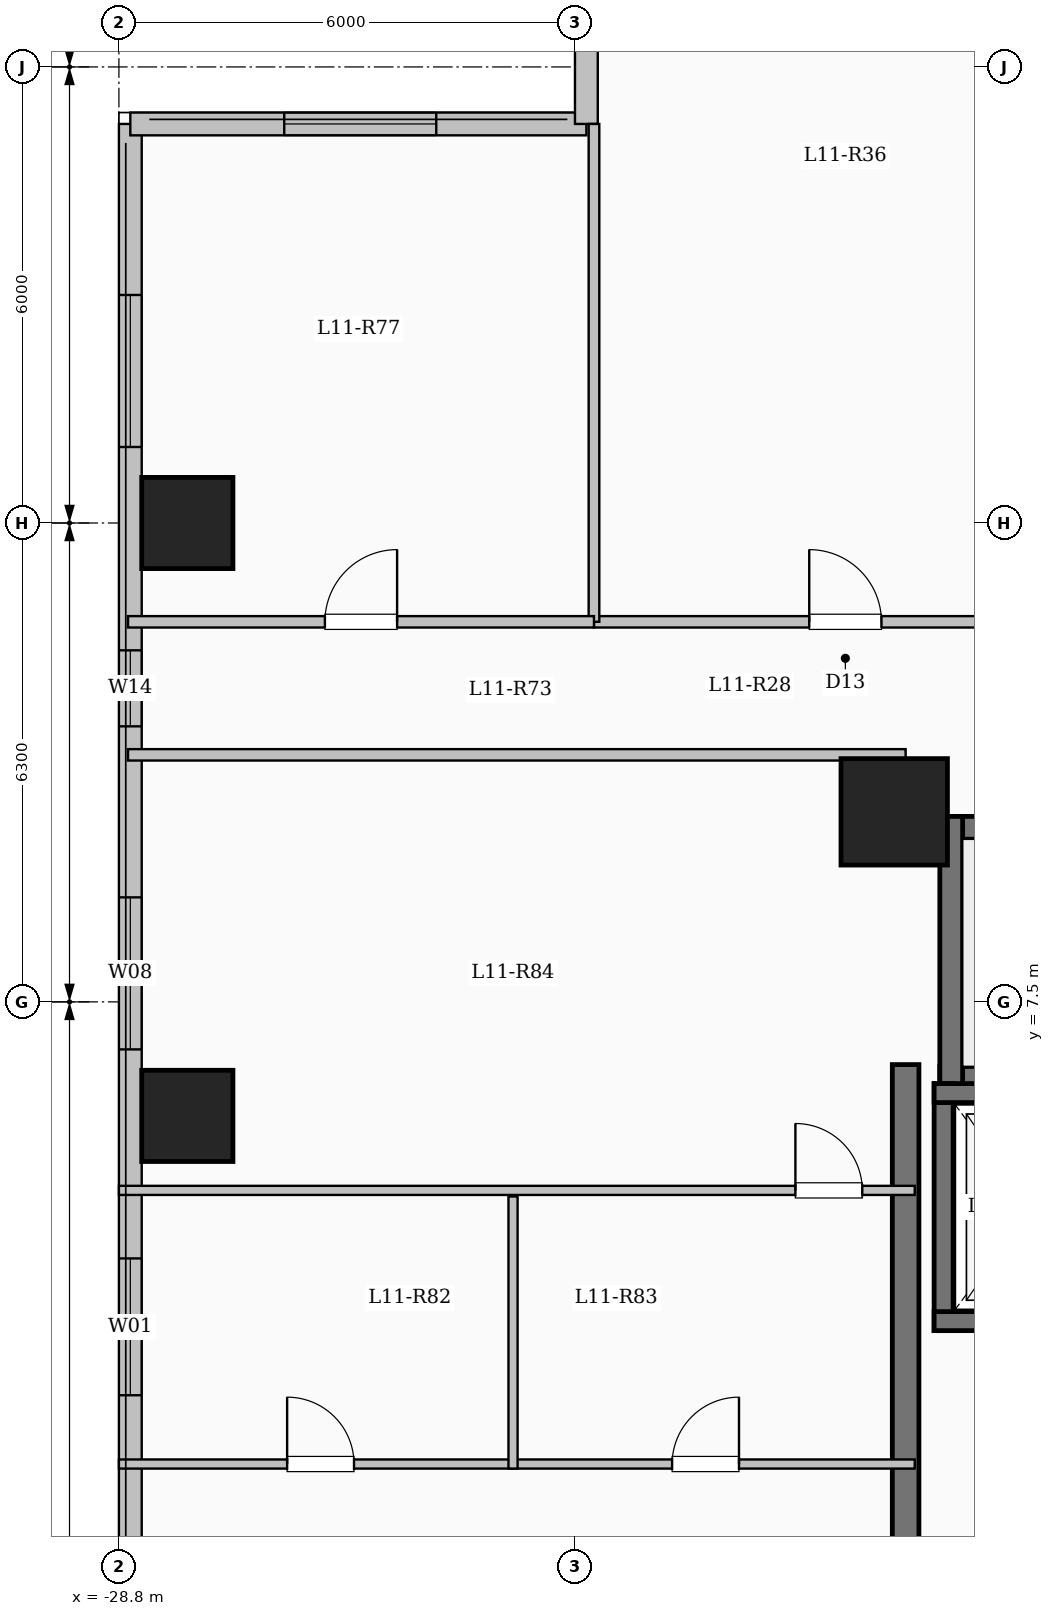
"""IFC4 building model, lengths in metres.
Left out: names, types, materials, properties, quantities, classifications, styles, units other than length and angle.
Written with IfcOpenShell. Run it as: python <this file> out.ifc"""

import sys

from ifc_helpers import new_model, si_unit, direction, frame, frame_2d, origin, origin_2d, place, context, subcontext, project, spatial, rectangle, extrude, element, fill, save


model = new_model("IFC4")
c1 = context("Model", 3, precision=1e-05, world=origin(), true_north=direction((0.0, 1.0)))
c2 = subcontext(c1, "Body", "Model", "MODEL_VIEW")
j1 = project(units=[si_unit("LENGTHUNIT", "METRE"), si_unit("PLANEANGLEUNIT", "RADIAN")], contexts=[c1])
p1 = place(None, origin())
s1 = spatial("IfcSite", under=j1, at=p1, CompositionType="ELEMENT")
p2 = place(p1, origin())
s2 = spatial("IfcBuilding", under=s1, at=p2, CompositionType="ELEMENT")
p3 = place(p2, frame((0.0, 0.0, 44.1)))
s3 = spatial("IfcBuildingStorey", under=s2, at=p3, CompositionType="ELEMENT", Elevation=44.1)
p4 = place(p3, frame((-18.6, 10.0, 0.0), z_axis=(0.0, 0.0, 1.0), x_axis=(1.0, 0.0, 0.0)))
e1 = element("IfcColumn", 1, at=p4, inside=s3, PredefinedType="COLUMN", context=c2, shape_type="SweptSolid", body=[
    extrude(rectangle(XDim=1.4, YDim=1.4, at=origin_2d()), origin(), (0.0, 0.0, 1.0), 3.35),
])
for number, where, z_axis, x_axis in (
    (2, (-27.9, 6.0, 0.0), (0.0, 0.0, 1.0), (1.0, 0.0, 0.0)),
    (3, (-27.9, 13.8, 0.0), (0.0, 0.0, 1.0), (1.0, 0.0, 0.0)),
):
    element("IfcColumn", number, at=place(p3, frame(where, z_axis=z_axis, x_axis=x_axis)), inside=s3, PredefinedType="COLUMN", context=c2, shape_type="SweptSolid", body=[
        extrude(rectangle(XDim=1.2, YDim=1.2, at=origin_2d()), origin(), (0.0, 0.0, 1.0), 3.35),
    ])
p5 = place(p3, frame((-28.65, -19.05, 0.0), z_axis=(0.0, 0.0, 1.0), x_axis=(0.0, 1.0, 0.0)))
e4 = element("IfcWall", 4, at=p5, inside=s3, PredefinedType="SOLIDWALL", context=c2, shape_type="SweptSolid", body=[
    extrude(rectangle(XDim=38.1, YDim=0.3, at=frame_2d((19.05, 0.0))), origin(), (0.0, 0.0, 1.0), 3.1),
])
p6 = place(p5, frame((3.15, 0.0, 0.9)))
e5 = element("IfcOpeningElement", 5, at=p6, cuts=e4, PredefinedType="OPENING", context=c2, shape_type="SweptSolid", body=[
    extrude(rectangle(XDim=2.4, YDim=1.8, at=frame_2d((1.2, 0.9))), frame((0.0, 0.16, 0.0), z_axis=(0.0, -1.0, 0.0), x_axis=(1.0, 0.0, 0.0)), (0.0, 0.0, 1.0), 0.32),
])
p7 = place(p5, frame((9.542, 0.0, 0.9)))
e6 = element("IfcOpeningElement", 6, at=p7, cuts=e4, PredefinedType="OPENING", context=c2, shape_type="SweptSolid", body=[
    extrude(rectangle(XDim=1.5, YDim=1.65, at=frame_2d((0.75, 0.825))), frame((0.0, 0.16, 0.0), z_axis=(0.0, -1.0, 0.0), x_axis=(1.0, 0.0, 0.0)), (0.0, 0.0, 1.0), 0.32),
])
p8 = place(p5, frame((14.95, 0.0, 0.9)))
e7 = element("IfcOpeningElement", 7, at=p8, cuts=e4, PredefinedType="OPENING", context=c2, shape_type="SweptSolid", body=[
    extrude(rectangle(XDim=2.4, YDim=1.8, at=frame_2d((1.2, 0.9))), frame((0.0, 0.16, 0.0), z_axis=(0.0, -1.0, 0.0), x_axis=(1.0, 0.0, 0.0)), (0.0, 0.0, 1.0), 0.32),
])
p9 = place(p5, frame((21.375, 0.0, 0.9)))
e8 = element("IfcOpeningElement", 8, at=p9, cuts=e4, PredefinedType="OPENING", context=c2, shape_type="SweptSolid", body=[
    extrude(rectangle(XDim=1.8, YDim=1.65, at=frame_2d((0.9, 0.825))), frame((0.0, 0.16, 0.0), z_axis=(0.0, -1.0, 0.0), x_axis=(1.0, 0.0, 0.0)), (0.0, 0.0, 1.0), 0.32),
])
p10 = place(p5, frame((25.925, 0.0, 0.9)))
e9 = element("IfcOpeningElement", 9, at=p10, cuts=e4, PredefinedType="OPENING", context=c2, shape_type="SweptSolid", body=[
    extrude(rectangle(XDim=2.0, YDim=1.7, at=frame_2d((1.0, 0.85))), frame((0.0, 0.16, 0.0), z_axis=(0.0, -1.0, 0.0), x_axis=(1.0, 0.0, 0.0)), (0.0, 0.0, 1.0), 0.32),
])
p11 = place(p5, frame((30.175, 0.0, 0.95)))
e10 = element("IfcOpeningElement", 10, at=p11, cuts=e4, PredefinedType="OPENING", context=c2, shape_type="SweptSolid", body=[
    extrude(rectangle(XDim=1.0, YDim=1.5, at=frame_2d((0.5, 0.75))), frame((0.0, 0.16, 0.0), z_axis=(0.0, -1.0, 0.0), x_axis=(1.0, 0.0, 0.0)), (0.0, 0.0, 1.0), 0.32),
])
p12 = place(p5, frame((33.85, 0.0, 0.9)))
e11 = element("IfcOpeningElement", 11, at=p12, cuts=e4, PredefinedType="OPENING", context=c2, shape_type="SweptSolid", body=[
    extrude(rectangle(XDim=2.0, YDim=1.7, at=frame_2d((1.0, 0.85))), frame((0.0, 0.16, 0.0), z_axis=(0.0, -1.0, 0.0), x_axis=(1.0, 0.0, 0.0)), (0.0, 0.0, 1.0), 0.32),
])
p13 = place(p3, frame((-28.65, 19.05, 0.0), z_axis=(0.0, 0.0, 1.0), x_axis=(1.0, 0.0, 0.0)))
e12 = element("IfcWall", 12, at=p13, inside=s3, PredefinedType="SOLIDWALL", context=c2, shape_type="SweptSolid", body=[
    extrude(rectangle(XDim=6.0, YDim=0.3, at=frame_2d((3.0, 0.0))), origin(), (0.0, 0.0, 1.0), 3.1),
])
p14 = place(p13, frame((2.025, 0.0, 0.9)))
e13 = element("IfcOpeningElement", 13, at=p14, cuts=e12, PredefinedType="OPENING", context=c2, shape_type="SweptSolid", body=[
    extrude(rectangle(XDim=2.0, YDim=1.7, at=frame_2d((1.0, 0.85))), frame((0.0, 0.16, 0.0), z_axis=(0.0, -1.0, 0.0), x_axis=(1.0, 0.0, 0.0)), (0.0, 0.0, 1.0), 0.32),
])
p15 = place(p3, frame((-22.65, 19.05, 0.0), z_axis=(0.0, 0.0, 1.0), x_axis=(0.0, 1.0, 0.0)))
e14 = element("IfcWall", 14, at=p15, inside=s3, PredefinedType="SOLIDWALL", context=c2, shape_type="SweptSolid", body=[
    extrude(rectangle(XDim=4.5, YDim=0.3, at=frame_2d((2.25, 0.0))), origin(), (0.0, 0.0, 1.0), 3.1),
])
p16 = place(p15, frame((1.232, 0.0, 0.9)))
e15 = element("IfcOpeningElement", 15, at=p16, cuts=e14, PredefinedType="OPENING", context=c2, shape_type="SweptSolid", body=[
    extrude(rectangle(XDim=2.0, YDim=1.7, at=frame_2d((1.0, 0.85))), frame((0.0, 0.16, 0.0), z_axis=(0.0, -1.0, 0.0), x_axis=(1.0, 0.0, 0.0)), (0.0, 0.0, 1.0), 0.32),
])
p17 = place(p3, frame((-18.0, 9.79, 0.0), z_axis=(0.0, 0.0, 1.0), x_axis=(1.0, 0.0, 0.0)))
e16 = element("IfcWall", 16, at=p17, inside=s3, PredefinedType="SHEAR", context=c2, shape_type="SweptSolid", body=[
    extrude(rectangle(XDim=8.0, YDim=0.3, at=frame_2d((4.0, 0.0))), origin(), (0.0, 0.0, 1.0), 3.35),
])
p18 = place(p3, frame((-18.0, 6.5, 0.0), z_axis=(0.0, 0.0, 1.0), x_axis=(1.0, 0.0, 0.0)))
e17 = element("IfcWall", 17, at=p18, inside=s3, PredefinedType="SHEAR", context=c2, shape_type="SweptSolid", body=[
    extrude(rectangle(XDim=8.0, YDim=0.3, at=frame_2d((4.0, 0.0))), origin(), (0.0, 0.0, 1.0), 3.35),
])
p19 = place(p18, frame((6.45, 0.0, 0.0)))
e18 = element("IfcOpeningElement", 18, at=p19, cuts=e17, PredefinedType="OPENING", context=c2, shape_type="SweptSolid", body=[
    extrude(rectangle(XDim=1.0, YDim=2.15, at=frame_2d((0.5, 1.075))), frame((0.0, 0.16, 0.0), z_axis=(0.0, -1.0, 0.0), x_axis=(1.0, 0.0, 0.0)), (0.0, 0.0, 1.0), 0.32),
])
p20 = place(p3, frame((-17.85, 6.35, 0.0), z_axis=(0.0, 0.0, 1.0), x_axis=(0.0, 1.0, 0.0)))
e19 = element("IfcWall", 19, at=p20, inside=s3, PredefinedType="SHEAR", context=c2, shape_type="SweptSolid", body=[
    extrude(rectangle(XDim=3.59, YDim=0.3, at=frame_2d((1.795, 0.0))), origin(), (0.0, 0.0, 1.0), 3.35),
])
p21 = place(p3, frame((-17.95, 3.175, 0.0), z_axis=(0.0, 0.0, 1.0), x_axis=(0.0, 1.0, 0.0)))
e20 = element("IfcWall", 20, at=p21, inside=s3, PredefinedType="SHEAR", context=c2, shape_type="SweptSolid", body=[
    extrude(rectangle(XDim=3.25, YDim=0.25, at=frame_2d((1.625, 0.0))), origin(), (0.0, 0.0, 1.0), 3.35),
])
for number, where, z_axis, x_axis in (
    (21, (-18.075, 3.3, 0.0), (0.0, 0.0, 1.0), (1.0, 0.0, 0.0)),
    (22, (-18.075, 6.3, 0.0), (0.0, 0.0, 1.0), (1.0, 0.0, 0.0)),
):
    element("IfcWall", number, at=place(p3, frame(where, z_axis=z_axis, x_axis=x_axis)), inside=s3, PredefinedType="SHEAR", context=c2, shape_type="SweptSolid", body=[
        extrude(rectangle(XDim=2.55, YDim=0.25, at=frame_2d((1.275, 0.0))), origin(), (0.0, 0.0, 1.0), 3.35),
    ])
p22 = place(p3, frame((-18.45, -7.375, 0.0), z_axis=(0.0, 0.0, 1.0), x_axis=(0.0, 1.0, 0.0)))
e23 = element("IfcWall", 23, at=p22, inside=s3, PredefinedType="SHEAR", context=c2, shape_type="SweptSolid", body=[
    extrude(rectangle(XDim=14.05, YDim=0.35, at=frame_2d((7.025, 0.0))), origin(), (0.0, 0.0, 1.0), 3.35),
])
p23 = place(p3, frame((-22.55, 12.5, 0.0), z_axis=(0.0, 0.0, 1.0), x_axis=(1.0, 0.0, 0.0)))
e24 = element("IfcWall", 24, at=p23, inside=s3, PredefinedType="PARTITIONING", context=c2, shape_type="SweptSolid", body=[
    extrude(rectangle(XDim=18.7, YDim=0.15, at=frame_2d((9.35, 0.0))), origin(), (0.0, 0.0, 1.0), 3.1),
])
p24 = place(p23, frame((2.832, 0.0, 0.0)))
e25 = element("IfcOpeningElement", 25, at=p24, cuts=e24, PredefinedType="OPENING", context=c2, shape_type="SweptSolid", body=[
    extrude(rectangle(XDim=0.95, YDim=2.15, at=frame_2d((0.475, 1.075))), frame((0.0, 0.085, 0.0), z_axis=(0.0, -1.0, 0.0), x_axis=(1.0, 0.0, 0.0)), (0.0, 0.0, 1.0), 0.17),
])
p25 = place(p23, frame((9.537, 0.0, 0.0)))
e26 = element("IfcOpeningElement", 26, at=p25, cuts=e24, PredefinedType="OPENING", context=c2, shape_type="SweptSolid", body=[
    extrude(rectangle(XDim=0.95, YDim=2.15, at=frame_2d((0.475, 1.075))), frame((0.0, 0.085, 0.0), z_axis=(0.0, -1.0, 0.0), x_axis=(1.0, 0.0, 0.0)), (0.0, 0.0, 1.0), 0.17),
])
p26 = place(p23, frame((15.5, 0.0, 0.0)))
e27 = element("IfcOpeningElement", 27, at=p26, cuts=e24, PredefinedType="OPENING", context=c2, shape_type="SweptSolid", body=[
    extrude(rectangle(XDim=0.95, YDim=2.15, at=frame_2d((0.475, 1.075))), frame((0.0, 0.085, 0.0), z_axis=(0.0, -1.0, 0.0), x_axis=(1.0, 0.0, 0.0)), (0.0, 0.0, 1.0), 0.17),
])
p27 = place(p3, frame((-28.68, 10.75, 0.0), z_axis=(0.0, 0.0, 1.0), x_axis=(1.0, 0.0, 0.0)))
e28 = element("IfcWall", 28, at=p27, inside=s3, PredefinedType="PARTITIONING", context=c2, shape_type="SweptSolid", body=[
    extrude(rectangle(XDim=10.23, YDim=0.15, at=frame_2d((5.115, 0.0))), origin(), (0.0, 0.0, 1.0), 3.1),
])
p28 = place(p3, frame((-22.55, 12.5, 0.0), z_axis=(0.0, 0.0, 1.0), x_axis=(0.0, 1.0, 0.0)))
e29 = element("IfcWall", 29, at=p28, inside=s3, PredefinedType="PARTITIONING", context=c2, shape_type="SweptSolid", body=[
    extrude(rectangle(XDim=6.55, YDim=0.14, at=frame_2d((3.275, 0.0))), origin(), (0.0, 0.0, 1.0), 3.1),
])
p29 = place(p3, frame((-28.68, 12.5, 0.0), z_axis=(0.0, 0.0, 1.0), x_axis=(1.0, 0.0, 0.0)))
e30 = element("IfcWall", 30, at=p29, inside=s3, PredefinedType="PARTITIONING", context=c2, shape_type="SweptSolid", body=[
    extrude(rectangle(XDim=6.13, YDim=0.15, at=frame_2d((3.065, 0.0))), origin(), (0.0, 0.0, 1.0), 3.1),
])
p30 = place(p29, frame((2.59, 0.0, 0.0)))
e31 = element("IfcOpeningElement", 31, at=p30, cuts=e30, PredefinedType="OPENING", context=c2, shape_type="SweptSolid", body=[
    extrude(rectangle(XDim=0.95, YDim=2.15, at=frame_2d((0.475, 1.075))), frame((0.0, 0.085, 0.0), z_axis=(0.0, -1.0, 0.0), x_axis=(1.0, 0.0, 0.0)), (0.0, 0.0, 1.0), 0.17),
])
p31 = place(p3, frame((-28.8, 1.42, 0.0), z_axis=(0.0, 0.0, 1.0), x_axis=(1.0, 0.0, 0.0)))
e32 = element("IfcWall", 32, at=p31, inside=s3, PredefinedType="PARTITIONING", context=c2, shape_type="SweptSolid", body=[
    extrude(rectangle(XDim=10.47, YDim=0.12, at=frame_2d((5.235, 0.0))), origin(), (0.0, 0.0, 1.0), 3.1),
])
p32 = place(p31, frame((2.213, 0.0, 0.0)))
e33 = element("IfcOpeningElement", 33, at=p32, cuts=e32, PredefinedType="OPENING", context=c2, shape_type="SweptSolid", body=[
    extrude(rectangle(XDim=0.88, YDim=2.1, at=frame_2d((0.44, 1.05))), frame((0.0, 0.07, 0.0), z_axis=(0.0, -1.0, 0.0), x_axis=(1.0, 0.0, 0.0)), (0.0, 0.0, 1.0), 0.14),
])
p33 = place(p31, frame((7.278, 0.0, 0.0)))
e34 = element("IfcOpeningElement", 34, at=p33, cuts=e32, PredefinedType="OPENING", context=c2, shape_type="SweptSolid", body=[
    extrude(rectangle(XDim=0.88, YDim=2.1, at=frame_2d((0.44, 1.05))), frame((0.0, 0.07, 0.0), z_axis=(0.0, -1.0, 0.0), x_axis=(1.0, 0.0, 0.0)), (0.0, 0.0, 1.0), 0.14),
])
p34 = place(p3, frame((-28.8, 5.02, 0.0), z_axis=(0.0, 0.0, 1.0), x_axis=(1.0, 0.0, 0.0)))
e35 = element("IfcWall", 35, at=p34, inside=s3, PredefinedType="PARTITIONING", context=c2, shape_type="SweptSolid", body=[
    extrude(rectangle(XDim=10.47, YDim=0.12, at=frame_2d((5.235, 0.0))), origin(), (0.0, 0.0, 1.0), 3.1),
])
p35 = place(p34, frame((8.9, 0.0, 0.0)))
e36 = element("IfcOpeningElement", 36, at=p35, cuts=e35, PredefinedType="OPENING", context=c2, shape_type="SweptSolid", body=[
    extrude(rectangle(XDim=0.88, YDim=2.1, at=frame_2d((0.44, 1.05))), frame((0.0, 0.07, 0.0), z_axis=(0.0, -1.0, 0.0), x_axis=(1.0, 0.0, 0.0)), (0.0, 0.0, 1.0), 0.14),
])
p36 = place(p3, frame((-23.615, 1.36, 0.0), z_axis=(0.0, 0.0, 1.0), x_axis=(0.0, 1.0, 0.0)))
e37 = element("IfcWall", 37, at=p36, inside=s3, PredefinedType="PARTITIONING", context=c2, shape_type="SweptSolid", body=[
    extrude(rectangle(XDim=3.58, YDim=0.12, at=frame_2d((1.79, 0.0))), origin(), (0.0, 0.0, 1.0), 3.1),
])
p37 = place(p9, origin())
e38 = element("IfcWindow", 38, at=p37, inside=s3, PartitioningType="SINGLE_PANEL", PredefinedType="WINDOW", context=c2, shape_type="SweptSolid", body=[
    extrude(rectangle(XDim=1.8, YDim=1.65, at=frame_2d((0.9, 0.825))), frame((0.0, 0.03, 0.0), z_axis=(0.0, -1.0, 0.0), x_axis=(1.0, 0.0, 0.0)), (0.0, 0.0, 1.0), 0.06),
])
fill(e8, e38)
p38 = place(p10, origin())
e39 = element("IfcWindow", 39, at=p38, inside=s3, PartitioningType="SINGLE_PANEL", PredefinedType="WINDOW", context=c2, shape_type="SweptSolid", body=[
    extrude(rectangle(XDim=2.0, YDim=1.7, at=frame_2d((1.0, 0.85))), frame((0.0, 0.03, 0.0), z_axis=(0.0, -1.0, 0.0), x_axis=(1.0, 0.0, 0.0)), (0.0, 0.0, 1.0), 0.06),
])
fill(e9, e39)
p39 = place(p11, origin())
e40 = element("IfcWindow", 40, at=p39, inside=s3, PartitioningType="SINGLE_PANEL", PredefinedType="WINDOW", context=c2, shape_type="SweptSolid", body=[
    extrude(rectangle(XDim=1.0, YDim=1.5, at=frame_2d((0.5, 0.75))), frame((0.0, 0.03, 0.0), z_axis=(0.0, -1.0, 0.0), x_axis=(1.0, 0.0, 0.0)), (0.0, 0.0, 1.0), 0.06),
])
fill(e10, e40)
p40 = place(p12, origin())
e41 = element("IfcWindow", 41, at=p40, inside=s3, PartitioningType="SINGLE_PANEL", PredefinedType="WINDOW", context=c2, shape_type="SweptSolid", body=[
    extrude(rectangle(XDim=2.0, YDim=1.7, at=frame_2d((1.0, 0.85))), frame((0.0, 0.03, 0.0), z_axis=(0.0, -1.0, 0.0), x_axis=(1.0, 0.0, 0.0)), (0.0, 0.0, 1.0), 0.06),
])
fill(e11, e41)
p41 = place(p14, origin())
e42 = element("IfcWindow", 42, at=p41, inside=s3, PartitioningType="SINGLE_PANEL", PredefinedType="WINDOW", context=c2, shape_type="SweptSolid", body=[
    extrude(rectangle(XDim=2.0, YDim=1.7, at=frame_2d((1.0, 0.85))), frame((0.0, 0.03, 0.0), z_axis=(0.0, -1.0, 0.0), x_axis=(1.0, 0.0, 0.0)), (0.0, 0.0, 1.0), 0.06),
])
fill(e13, e42)
p42 = place(p24, origin())
e43 = element("IfcDoor", 43, at=p42, inside=s3, OperationType="SINGLE_SWING_LEFT", PredefinedType="DOOR", context=c2, shape_type="SweptSolid", body=[
    extrude(rectangle(XDim=0.95, YDim=2.15, at=frame_2d((0.475, 1.075))), frame((0.0, 0.025, 0.0), z_axis=(0.0, -1.0, 0.0), x_axis=(1.0, 0.0, 0.0)), (0.0, 0.0, 1.0), 0.05),
])
fill(e25, e43)
p43 = place(p30, origin())
e44 = element("IfcDoor", 44, at=p43, inside=s3, OperationType="SINGLE_SWING_RIGHT", PredefinedType="DOOR", context=c2, shape_type="SweptSolid", body=[
    extrude(rectangle(XDim=0.95, YDim=2.15, at=frame_2d((0.475, 1.075))), frame((0.0, 0.025, 0.0), z_axis=(0.0, -1.0, 0.0), x_axis=(1.0, 0.0, 0.0)), (0.0, 0.0, 1.0), 0.05),
])
fill(e31, e44)
p44 = place(p32, origin())
e45 = element("IfcDoor", 45, at=p44, inside=s3, OperationType="SINGLE_SWING_LEFT", PredefinedType="DOOR", context=c2, shape_type="SweptSolid", body=[
    extrude(rectangle(XDim=0.88, YDim=2.1, at=frame_2d((0.44, 1.05))), frame((0.0, 0.025, 0.0), z_axis=(0.0, -1.0, 0.0), x_axis=(1.0, 0.0, 0.0)), (0.0, 0.0, 1.0), 0.05),
])
fill(e33, e45)
p45 = place(p33, origin())
e46 = element("IfcDoor", 46, at=p45, inside=s3, OperationType="SINGLE_SWING_RIGHT", PredefinedType="DOOR", context=c2, shape_type="SweptSolid", body=[
    extrude(rectangle(XDim=0.88, YDim=2.1, at=frame_2d((0.44, 1.05))), frame((0.0, 0.025, 0.0), z_axis=(0.0, -1.0, 0.0), x_axis=(1.0, 0.0, 0.0)), (0.0, 0.0, 1.0), 0.05),
])
fill(e34, e46)
p46 = place(p35, origin())
e47 = element("IfcDoor", 47, at=p46, inside=s3, OperationType="SINGLE_SWING_LEFT", PredefinedType="DOOR", context=c2, shape_type="SweptSolid", body=[
    extrude(rectangle(XDim=0.88, YDim=2.1, at=frame_2d((0.44, 1.05))), frame((0.0, 0.025, 0.0), z_axis=(0.0, -1.0, 0.0), x_axis=(1.0, 0.0, 0.0)), (0.0, 0.0, 1.0), 0.05),
])
fill(e36, e47)
save(model, sys.argv[1])
